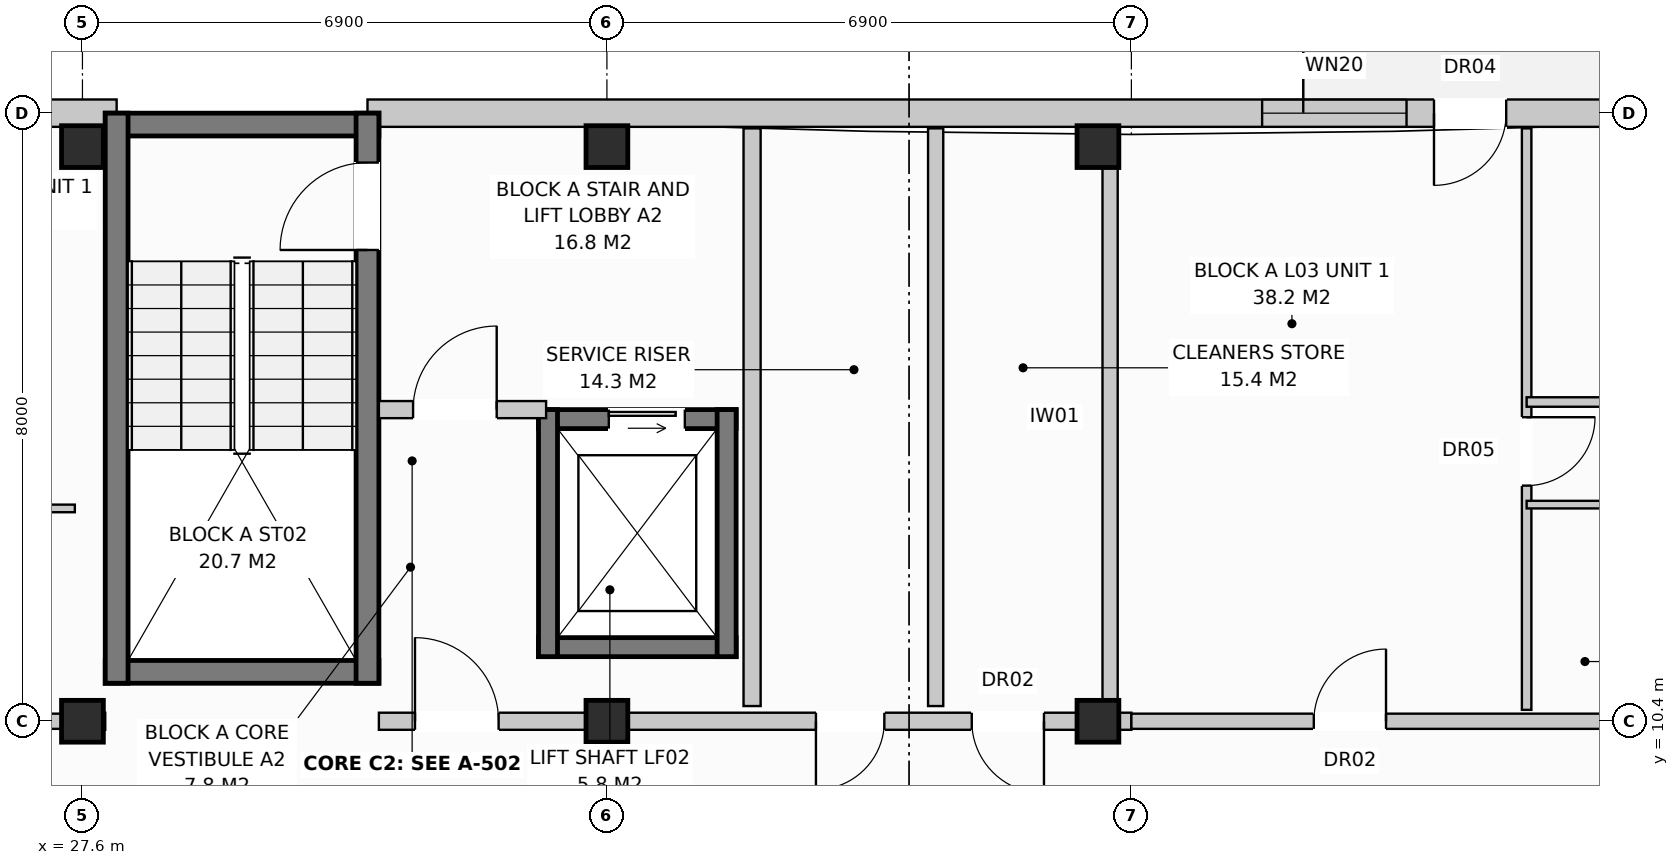
"""IFC4 building model, lengths in metres.
Left out: names, types, materials, properties, quantities, classifications, styles, units other than length and angle.
Written with IfcOpenShell. Run it as: python <this file> out.ifc"""

import sys

from ifc_helpers import new_model, si_unit, direction, frame, frame_2d, origin, origin_with_axes, origin_2d, place, context, subcontext, project, spatial, rectangle, extrude, element, fill, save


model = new_model("IFC4")
c1 = context("Model", 3, precision=1e-05, world=origin(), true_north=direction((0.0, 1.0)))
c2 = subcontext(c1, "Body", "Model", "MODEL_VIEW")
j1 = project(units=[si_unit("LENGTHUNIT", "METRE"), si_unit("PLANEANGLEUNIT", "RADIAN")], contexts=[c1])
p1 = place(None, origin())
s1 = spatial("IfcSite", under=j1, at=p1, CompositionType="ELEMENT")
p2 = place(p1, origin())
s2 = spatial("IfcBuilding", under=s1, at=p2, CompositionType="ELEMENT")
p3 = place(p2, frame((0.0, 0.0, 11.2)))
s3 = spatial("IfcBuildingStorey", under=s2, at=p3, CompositionType="ELEMENT", Elevation=11.2)
for number, where, z_axis, x_axis in (
    (1, (27.6, 10.4, 0.0), (0.0, 0.0, 1.0), (1.0, 0.0, 0.0)),
    (2, (27.6, 17.96, 0.0), (0.0, 0.0, 1.0), (1.0, 0.0, 0.0)),
    (3, (34.5, 10.4, 0.0), (0.0, 0.0, 1.0), (1.0, 0.0, 0.0)),
    (4, (34.5, 17.96, 0.0), (0.0, 0.0, 1.0), (1.0, 0.0, 0.0)),
    (5, (40.96, 10.4, 0.0), (0.0, 0.0, 1.0), (1.0, 0.0, 0.0)),
    (6, (40.96, 17.96, 0.0), (0.0, 0.0, 1.0), (1.0, 0.0, 0.0)),
):
    element("IfcColumn", number, at=place(p3, frame(where, z_axis=z_axis, x_axis=x_axis)), inside=s3, PredefinedType="COLUMN", context=c2, shape_type="SweptSolid", body=[
        extrude(rectangle(XDim=0.55, YDim=0.55, at=origin_2d()), origin(), (0.0, 0.0, 1.0), 3.2),
    ])
p4 = place(p3, frame((10.65, 18.4, 0.0), z_axis=(0.0, 0.0, 1.0), x_axis=(1.0, 0.0, 0.0)))
e7 = element("IfcWall", 7, at=p4, inside=s3, PredefinedType="STANDARD", context=c2, shape_type="SweptSolid", body=[
    extrude(rectangle(XDim=17.4, YDim=0.36, at=frame_2d((8.7, 0.0))), origin(), (0.0, 0.0, 1.0), 2.94),
])
p5 = place(p4, frame((11.87, 0.0, 0.0)))
e8 = element("IfcOpeningElement", 8, at=p5, cuts=e7, PredefinedType="OPENING", context=c2, shape_type="SweptSolid", body=[
    extrude(rectangle(XDim=0.95, YDim=2.1, at=frame_2d((0.475, 1.05))), frame((0.0, 0.192, 0.0), z_axis=(0.0, -1.0, 0.0), x_axis=(1.0, 0.0, 0.0)), (0.0, 0.0, 1.0), 0.384),
])
p6 = place(p4, frame((14.97, 0.0, 0.72)))
e9 = element("IfcOpeningElement", 9, at=p6, cuts=e7, PredefinedType="OPENING", context=c2, shape_type="SweptSolid", body=[
    extrude(rectangle(XDim=1.1, YDim=1.5, at=frame_2d((0.55, 0.75))), frame((0.0, 0.192, 0.0), z_axis=(0.0, -1.0, 0.0), x_axis=(1.0, 0.0, 0.0)), (0.0, 0.0, 1.0), 0.384),
])
p7 = place(p3, frame((31.35, 18.4, 0.0), z_axis=(0.0, 0.0, 1.0), x_axis=(1.0, 0.0, 0.0)))
e10 = element("IfcWall", 10, at=p7, inside=s3, PredefinedType="STANDARD", context=c2, shape_type="SweptSolid", body=[
    extrude(rectangle(XDim=23.68, YDim=0.36, at=frame_2d((11.84, 0.0))), origin(), (0.0, 0.0, 1.0), 2.94),
])
p8 = place(p7, frame((14.031, 0.0, 0.0)))
e11 = element("IfcOpeningElement", 11, at=p8, cuts=e10, PredefinedType="OPENING", context=c2, shape_type="SweptSolid", body=[
    extrude(rectangle(XDim=0.95, YDim=2.1, at=frame_2d((0.475, 1.05))), frame((0.0, 0.192, 0.0), z_axis=(0.0, -1.0, 0.0), x_axis=(1.0, 0.0, 0.0)), (0.0, 0.0, 1.0), 0.384),
])
p9 = place(p7, frame((11.77, 0.0, 0.8)))
e12 = element("IfcOpeningElement", 12, at=p9, cuts=e10, PredefinedType="OPENING", context=c2, shape_type="SweptSolid", body=[
    extrude(rectangle(XDim=1.9, YDim=1.85, at=frame_2d((0.95, 0.925))), frame((0.0, 0.192, 0.0), z_axis=(0.0, -1.0, 0.0), x_axis=(1.0, 0.0, 0.0)), (0.0, 0.0, 1.0), 0.384),
])
p10 = place(p7, frame((17.403, 0.0, 0.8)))
e13 = element("IfcOpeningElement", 13, at=p10, cuts=e10, PredefinedType="OPENING", context=c2, shape_type="SweptSolid", body=[
    extrude(rectangle(XDim=1.95, YDim=1.65, at=frame_2d((0.975, 0.825))), frame((0.0, 0.192, 0.0), z_axis=(0.0, -1.0, 0.0), x_axis=(1.0, 0.0, 0.0)), (0.0, 0.0, 1.0), 0.384),
])
p11 = place(p7, frame((21.07, 0.0, 0.72)))
e14 = element("IfcOpeningElement", 14, at=p11, cuts=e10, PredefinedType="OPENING", context=c2, shape_type="SweptSolid", body=[
    extrude(rectangle(XDim=1.1, YDim=1.5, at=frame_2d((0.55, 0.75))), frame((0.0, 0.192, 0.0), z_axis=(0.0, -1.0, 0.0), x_axis=(1.0, 0.0, 0.0)), (0.0, 0.0, 1.0), 0.384),
])
for number, where, z_axis, x_axis in (
    (15, (27.9, 18.25, 0.0), (0.0, 0.0, 1.0), (1.0, 0.0, 0.0)),
    (16, (27.9, 11.05, 0.0), (0.0, 0.0, 1.0), (1.0, 0.0, 0.0)),
):
    element("IfcWall", number, at=place(p3, frame(where, z_axis=z_axis, x_axis=x_axis)), inside=s3, PredefinedType="SHEAR", context=c2, shape_type="SweptSolid", body=[
        extrude(rectangle(XDim=3.6, YDim=0.3, at=frame_2d((1.8, 0.0))), origin(), (0.0, 0.0, 1.0), 2.94),
    ])
p12 = place(p3, frame((28.05, 10.9, 0.0), z_axis=(0.0, 0.0, 1.0), x_axis=(0.0, 1.0, 0.0)))
e17 = element("IfcWall", 17, at=p12, inside=s3, PredefinedType="SHEAR", context=c2, shape_type="SweptSolid", body=[
    extrude(rectangle(XDim=7.5, YDim=0.3, at=frame_2d((3.75, 0.0))), origin(), (0.0, 0.0, 1.0), 2.94),
])
p13 = place(p3, frame((31.35, 10.9, 0.0), z_axis=(0.0, 0.0, 1.0), x_axis=(0.0, 1.0, 0.0)))
e18 = element("IfcWall", 18, at=p13, inside=s3, PredefinedType="SHEAR", context=c2, shape_type="SweptSolid", body=[
    extrude(rectangle(XDim=7.5, YDim=0.3, at=frame_2d((3.75, 0.0))), origin(), (0.0, 0.0, 1.0), 2.94),
])
p14 = place(p13, frame((5.7, 0.0, 0.0)))
e19 = element("IfcOpeningElement", 19, at=p14, cuts=e18, PredefinedType="OPENING", context=c2, shape_type="SweptSolid", body=[
    extrude(rectangle(XDim=1.15, YDim=2.15, at=frame_2d((0.575, 1.075))), frame((0.0, 0.162, 0.0), z_axis=(0.0, -1.0, 0.0), x_axis=(1.0, 0.0, 0.0)), (0.0, 0.0, 1.0), 0.324),
])
p15 = place(p3, frame((33.6, 14.375, 0.0), z_axis=(0.0, 0.0, 1.0), x_axis=(1.0, 0.0, 0.0)))
e20 = element("IfcWall", 20, at=p15, inside=s3, PredefinedType="SHEAR", context=c2, shape_type="SweptSolid", body=[
    extrude(rectangle(XDim=2.6, YDim=0.25, at=frame_2d((1.3, 0.0))), origin(), (0.0, 0.0, 1.0), 2.94),
])
p16 = place(p15, frame((0.925, 0.0, 0.0)))
e21 = element("IfcOpeningElement", 21, at=p16, cuts=e20, PredefinedType="OPENING", context=c2, shape_type="SweptSolid", body=[
    extrude(rectangle(XDim=1.0, YDim=2.1, at=frame_2d((0.5, 1.05))), frame((0.0, 0.137, 0.0), z_axis=(0.0, -1.0, 0.0), x_axis=(1.0, 0.0, 0.0)), (0.0, 0.0, 1.0), 0.274),
])
p17 = place(p3, frame((33.6, 11.375, 0.0), z_axis=(0.0, 0.0, 1.0), x_axis=(1.0, 0.0, 0.0)))
e22 = element("IfcWall", 22, at=p17, inside=s3, PredefinedType="SHEAR", context=c2, shape_type="SweptSolid", body=[
    extrude(rectangle(XDim=2.6, YDim=0.25, at=frame_2d((1.3, 0.0))), origin(), (0.0, 0.0, 1.0), 2.94),
])
for number, where, z_axis, x_axis in (
    (23, (33.725, 11.25, 0.0), (0.0, 0.0, 1.0), (0.0, 1.0, 0.0)),
    (24, (36.075, 11.25, 0.0), (0.0, 0.0, 1.0), (0.0, 1.0, 0.0)),
):
    element("IfcWall", number, at=place(p3, frame(where, z_axis=z_axis, x_axis=x_axis)), inside=s3, PredefinedType="SHEAR", context=c2, shape_type="SweptSolid", body=[
        extrude(rectangle(XDim=3.25, YDim=0.25, at=frame_2d((1.625, 0.0))), origin(), (0.0, 0.0, 1.0), 2.94),
    ])
p18 = place(p3, frame((36.41, 10.6, 0.0), z_axis=(0.0, 0.0, 1.0), x_axis=(0.0, 1.0, 0.0)))
e25 = element("IfcWall", 25, at=p18, inside=s3, PredefinedType="PARTITIONING", context=c2, shape_type="SweptSolid", body=[
    extrude(rectangle(XDim=7.6, YDim=0.225, at=frame_2d((3.8, 0.0))), origin(), (0.0, 0.0, 1.0), 2.59),
])
p19 = place(p3, frame((31.5, 14.5, 0.0), z_axis=(0.0, 0.0, 1.0), x_axis=(1.0, 0.0, 0.0)))
e26 = element("IfcWall", 26, at=p19, inside=s3, PredefinedType="PARTITIONING", context=c2, shape_type="SweptSolid", body=[
    extrude(rectangle(XDim=2.2, YDim=0.225, at=frame_2d((1.1, 0.0))), origin(), (0.0, 0.0, 1.0), 2.94),
])
p20 = place(p19, frame((0.45, 0.0, 0.0)))
e27 = element("IfcOpeningElement", 27, at=p20, cuts=e26, PredefinedType="OPENING", context=c2, shape_type="SweptSolid", body=[
    extrude(rectangle(XDim=1.1, YDim=2.15, at=frame_2d((0.55, 1.075))), frame((0.0, 0.125, 0.0), z_axis=(0.0, -1.0, 0.0), x_axis=(1.0, 0.0, 0.0)), (0.0, 0.0, 1.0), 0.249),
])
p21 = place(p3, frame((27.6, 10.4, 0.0), z_axis=(0.0, 0.0, 1.0), x_axis=(1.0, 0.0, 0.0)))
e28 = element("IfcWall", 28, at=p21, inside=s3, PredefinedType="PARTITIONING", context=c2, shape_type="SweptSolid", body=[
    extrude(rectangle(XDim=0.3, YDim=0.225, at=frame_2d((0.15, 0.0))), origin(), (0.0, 0.0, 1.0), 2.94),
])
for number, where, z_axis, x_axis in (
    (29, (38.825, 10.6, 0.0), (0.0, 0.0, 1.0), (0.0, 1.0, 0.0)),
    (30, (41.12, 10.6, 0.0), (0.0, 0.0, 1.0), (0.0, 1.0, 0.0)),
):
    element("IfcWall", number, at=place(p3, frame(where, z_axis=z_axis, x_axis=x_axis)), inside=s3, PredefinedType="PARTITIONING", context=c2, shape_type="SweptSolid", body=[
        extrude(rectangle(XDim=7.6, YDim=0.2, at=frame_2d((3.8, 0.0))), origin(), (0.0, 0.0, 1.0), 2.94),
    ])
p22 = place(p3, frame((31.5, 10.4, 0.0), z_axis=(0.0, 0.0, 1.0), x_axis=(1.0, 0.0, 0.0)))
e31 = element("IfcWall", 31, at=p22, inside=s3, PredefinedType="PARTITIONING", context=c2, shape_type="SweptSolid", body=[
    extrude(rectangle(XDim=9.9, YDim=0.225, at=frame_2d((4.95, 0.0))), origin(), (0.0, 0.0, 1.0), 2.38),
])
p23 = place(p22, frame((0.475, 0.0, 0.0)))
e32 = element("IfcOpeningElement", 32, at=p23, cuts=e31, PredefinedType="OPENING", context=c2, shape_type="SweptSolid", body=[
    extrude(rectangle(XDim=1.1, YDim=2.15, at=frame_2d((0.55, 1.075))), frame((0.0, 0.125, 0.0), z_axis=(0.0, -1.0, 0.0), x_axis=(1.0, 0.0, 0.0)), (0.0, 0.0, 1.0), 0.249),
])
p24 = place(p22, frame((5.75, 0.0, 0.0)))
e33 = element("IfcOpeningElement", 33, at=p24, cuts=e31, PredefinedType="OPENING", context=c2, shape_type="SweptSolid", body=[
    extrude(rectangle(XDim=0.9, YDim=2.1, at=frame_2d((0.45, 1.05))), frame((0.0, 0.125, 0.0), z_axis=(0.0, -1.0, 0.0), x_axis=(1.0, 0.0, 0.0)), (0.0, 0.0, 1.0), 0.249),
])
p25 = place(p22, frame((7.8, 0.0, 0.0)))
e34 = element("IfcOpeningElement", 34, at=p25, cuts=e31, PredefinedType="OPENING", context=c2, shape_type="SweptSolid", body=[
    extrude(rectangle(XDim=0.95, YDim=2.15, at=frame_2d((0.475, 1.075))), frame((0.0, 0.125, 0.0), z_axis=(0.0, -1.0, 0.0), x_axis=(1.0, 0.0, 0.0)), (0.0, 0.0, 1.0), 0.249),
])
p26 = place(p3, frame((20.7, 10.4, 0.0), z_axis=(0.0, 0.0, 1.0), x_axis=(1.0, 0.0, 0.0)))
e35 = element("IfcWall", 35, at=p26, inside=s3, PredefinedType="PARTITIONING", context=c2, shape_type="SweptSolid", body=[
    extrude(rectangle(XDim=6.9, YDim=0.2, at=frame_2d((3.45, 0.0))), origin(), (0.0, 0.0, 1.0), 2.38),
])
p27 = place(p26, frame((2.0, 0.0, 0.0)))
e36 = element("IfcOpeningElement", 36, at=p27, cuts=e35, PredefinedType="OPENING", context=c2, shape_type="SweptSolid", body=[
    extrude(rectangle(XDim=0.95, YDim=2.15, at=frame_2d((0.475, 1.075))), frame((0.0, 0.112, 0.0), z_axis=(0.0, -1.0, 0.0), x_axis=(1.0, 0.0, 0.0)), (0.0, 0.0, 1.0), 0.224),
])
p28 = place(p3, frame((25.0, 13.2, 0.0), z_axis=(0.0, 0.0, 1.0), x_axis=(1.0, 0.0, 0.0)))
e37 = element("IfcWall", 37, at=p28, inside=s3, PredefinedType="PARTITIONING", context=c2, shape_type="SweptSolid", body=[
    extrude(rectangle(XDim=2.5, YDim=0.1, at=frame_2d((1.25, 0.0))), origin(), (0.0, 0.0, 1.0), 2.94),
])
p29 = place(p3, frame((41.4, 10.4, 0.0), z_axis=(0.0, 0.0, 1.0), x_axis=(1.0, 0.0, 0.0)))
e38 = element("IfcWall", 38, at=p29, inside=s3, PredefinedType="PARTITIONING", context=c2, shape_type="SweptSolid", body=[
    extrude(rectangle(XDim=13.8, YDim=0.2, at=frame_2d((6.9, 0.0))), origin(), (0.0, 0.0, 1.0), 2.38),
])
p30 = place(p29, frame((2.4, 0.0, 0.0)))
e39 = element("IfcOpeningElement", 39, at=p30, cuts=e38, PredefinedType="OPENING", context=c2, shape_type="SweptSolid", body=[
    extrude(rectangle(XDim=0.95, YDim=2.15, at=frame_2d((0.475, 1.075))), frame((0.0, 0.112, 0.0), z_axis=(0.0, -1.0, 0.0), x_axis=(1.0, 0.0, 0.0)), (0.0, 0.0, 1.0), 0.224),
])
p31 = place(p3, frame((46.6, 10.55, 0.0), z_axis=(0.0, 0.0, 1.0), x_axis=(0.0, 1.0, 0.0)))
e40 = element("IfcWall", 40, at=p31, inside=s3, PredefinedType="PARTITIONING", context=c2, shape_type="SweptSolid", body=[
    extrude(rectangle(XDim=7.65, YDim=0.125, at=frame_2d((3.825, 0.0))), origin(), (0.0, 0.0, 1.0), 2.94),
])
p32 = place(p31, frame((2.95, 0.0, 0.0)))
e41 = element("IfcOpeningElement", 41, at=p32, cuts=e40, PredefinedType="OPENING", context=c2, shape_type="SweptSolid", body=[
    extrude(rectangle(XDim=0.9, YDim=2.1, at=frame_2d((0.45, 1.05))), frame((0.0, 0.074, 0.0), z_axis=(0.0, -1.0, 0.0), x_axis=(1.0, 0.0, 0.0)), (0.0, 0.0, 1.0), 0.149),
])
p33 = place(p3, frame((46.6, 13.25, 0.0), z_axis=(0.0, 0.0, 1.0), x_axis=(1.0, 0.0, 0.0)))
e42 = element("IfcWall", 42, at=p33, inside=s3, PredefinedType="PARTITIONING", context=c2, shape_type="SweptSolid", body=[
    extrude(rectangle(XDim=8.5, YDim=0.1, at=frame_2d((4.25, 0.0))), origin(), (0.0, 0.0, 1.0), 2.94),
])
p34 = place(p33, frame((1.0, 0.0, 0.0)))
e43 = element("IfcOpeningElement", 43, at=p34, cuts=e42, PredefinedType="OPENING", context=c2, shape_type="SweptSolid", body=[
    extrude(rectangle(XDim=0.85, YDim=2.1, at=frame_2d((0.425, 1.05))), frame((0.0, 0.062, 0.0), z_axis=(0.0, -1.0, 0.0), x_axis=(1.0, 0.0, 0.0)), (0.0, 0.0, 1.0), 0.124),
])
p35 = place(p33, frame((3.4, 0.0, 0.0)))
e44 = element("IfcOpeningElement", 44, at=p35, cuts=e42, PredefinedType="OPENING", context=c2, shape_type="SweptSolid", body=[
    extrude(rectangle(XDim=0.85, YDim=2.05, at=frame_2d((0.425, 1.025))), frame((0.0, 0.062, 0.0), z_axis=(0.0, -1.0, 0.0), x_axis=(1.0, 0.0, 0.0)), (0.0, 0.0, 1.0), 0.124),
])
p36 = place(p33, frame((6.2, 0.0, 0.0)))
e45 = element("IfcOpeningElement", 45, at=p36, cuts=e42, PredefinedType="OPENING", context=c2, shape_type="SweptSolid", body=[
    extrude(rectangle(XDim=0.85, YDim=2.05, at=frame_2d((0.425, 1.025))), frame((0.0, 0.062, 0.0), z_axis=(0.0, -1.0, 0.0), x_axis=(1.0, 0.0, 0.0)), (0.0, 0.0, 1.0), 0.124),
])
p37 = place(p3, frame((46.6, 14.6, 0.0), z_axis=(0.0, 0.0, 1.0), x_axis=(1.0, 0.0, 0.0)))
e46 = element("IfcWall", 46, at=p37, inside=s3, PredefinedType="PARTITIONING", context=c2, shape_type="SweptSolid", body=[
    extrude(rectangle(XDim=8.5, YDim=0.125, at=frame_2d((4.25, 0.0))), origin(), (0.0, 0.0, 1.0), 2.94),
])
p38 = place(p37, frame((1.5, 0.0, 0.0)))
e47 = element("IfcOpeningElement", 47, at=p38, cuts=e46, PredefinedType="OPENING", context=c2, shape_type="SweptSolid", body=[
    extrude(rectangle(XDim=0.9, YDim=2.1, at=frame_2d((0.45, 1.05))), frame((0.0, 0.074, 0.0), z_axis=(0.0, -1.0, 0.0), x_axis=(1.0, 0.0, 0.0)), (0.0, 0.0, 1.0), 0.149),
])
p39 = place(p37, frame((5.6, 0.0, 0.0)))
e48 = element("IfcOpeningElement", 48, at=p39, cuts=e46, PredefinedType="OPENING", context=c2, shape_type="SweptSolid", body=[
    extrude(rectangle(XDim=0.9, YDim=2.1, at=frame_2d((0.45, 1.05))), frame((0.0, 0.074, 0.0), z_axis=(0.0, -1.0, 0.0), x_axis=(1.0, 0.0, 0.0)), (0.0, 0.0, 1.0), 0.149),
])
p40 = place(p8, frame((0.95, 0.0, 0.0), z_axis=(0.0, 0.0, 1.0), x_axis=(-1.0, 0.0, 0.0)))
e49 = element("IfcDoor", 49, at=p40, inside=s3, OperationType="SINGLE_SWING_LEFT", PredefinedType="DOOR", context=c2, shape_type="SweptSolid", body=[
    extrude(rectangle(XDim=0.95, YDim=2.1, at=frame_2d((0.475, 1.05))), frame((0.0, 0.025, 0.0), z_axis=(0.0, -1.0, 0.0), x_axis=(1.0, 0.0, 0.0)), (0.0, 0.0, 1.0), 0.05),
])
fill(e11, e49)
p41 = place(p9, origin_with_axes())
e50 = element("IfcWindow", 50, at=p41, inside=s3, PartitioningType="SINGLE_PANEL", PredefinedType="WINDOW", context=c2, shape_type="SweptSolid", body=[
    extrude(rectangle(XDim=1.9, YDim=1.85, at=frame_2d((0.95, 0.925))), frame((0.0, 0.03, 0.0), z_axis=(0.0, -1.0, 0.0), x_axis=(1.0, 0.0, 0.0)), (0.0, 0.0, 1.0), 0.06),
])
fill(e12, e50)
p42 = place(p14, origin_with_axes())
e51 = element("IfcDoor", 51, at=p42, inside=s3, OperationType="SINGLE_SWING_LEFT", PredefinedType="DOOR", context=c2, shape_type="SweptSolid", body=[
    extrude(rectangle(XDim=1.15, YDim=2.15, at=frame_2d((0.575, 1.075))), frame((0.0, 0.025, 0.0), z_axis=(0.0, -1.0, 0.0), x_axis=(1.0, 0.0, 0.0)), (0.0, 0.0, 1.0), 0.05),
])
fill(e19, e51)
p43 = place(p16, origin_with_axes())
e52 = element("IfcDoor", 52, at=p43, inside=s3, OperationType="SLIDING_TO_LEFT", PredefinedType="DOOR", context=c2, shape_type="SweptSolid", body=[
    extrude(rectangle(XDim=1.0, YDim=2.1, at=frame_2d((0.5, 1.05))), frame((0.0, 0.025, 0.0), z_axis=(0.0, -1.0, 0.0), x_axis=(1.0, 0.0, 0.0)), (0.0, 0.0, 1.0), 0.05),
])
fill(e21, e52)
p44 = place(p20, origin_with_axes())
e53 = element("IfcDoor", 53, at=p44, inside=s3, OperationType="SINGLE_SWING_RIGHT", PredefinedType="DOOR", context=c2, shape_type="SweptSolid", body=[
    extrude(rectangle(XDim=1.1, YDim=2.15, at=frame_2d((0.55, 1.075))), frame((0.0, 0.025, 0.0), z_axis=(0.0, -1.0, 0.0), x_axis=(1.0, 0.0, 0.0)), (0.0, 0.0, 1.0), 0.05),
])
fill(e27, e53)
p45 = place(p23, origin_with_axes())
e54 = element("IfcDoor", 54, at=p45, inside=s3, OperationType="SINGLE_SWING_LEFT", PredefinedType="DOOR", context=c2, shape_type="SweptSolid", body=[
    extrude(rectangle(XDim=1.1, YDim=2.15, at=frame_2d((0.55, 1.075))), frame((0.0, 0.025, 0.0), z_axis=(0.0, -1.0, 0.0), x_axis=(1.0, 0.0, 0.0)), (0.0, 0.0, 1.0), 0.05),
])
fill(e32, e54)
p46 = place(p24, frame((0.9, 0.0, 0.0), z_axis=(0.0, 0.0, 1.0), x_axis=(-1.0, 0.0, 0.0)))
e55 = element("IfcDoor", 55, at=p46, inside=s3, OperationType="SINGLE_SWING_LEFT", PredefinedType="DOOR", context=c2, shape_type="SweptSolid", body=[
    extrude(rectangle(XDim=0.9, YDim=2.1, at=frame_2d((0.45, 1.05))), frame((0.0, 0.025, 0.0), z_axis=(0.0, -1.0, 0.0), x_axis=(1.0, 0.0, 0.0)), (0.0, 0.0, 1.0), 0.05),
])
fill(e33, e55)
p47 = place(p25, frame((0.95, 0.0, 0.0), z_axis=(0.0, 0.0, 1.0), x_axis=(-1.0, 0.0, 0.0)))
e56 = element("IfcDoor", 56, at=p47, inside=s3, OperationType="SINGLE_SWING_RIGHT", PredefinedType="DOOR", context=c2, shape_type="SweptSolid", body=[
    extrude(rectangle(XDim=0.95, YDim=2.15, at=frame_2d((0.475, 1.075))), frame((0.0, 0.025, 0.0), z_axis=(0.0, -1.0, 0.0), x_axis=(1.0, 0.0, 0.0)), (0.0, 0.0, 1.0), 0.05),
])
fill(e34, e56)
p48 = place(p30, origin_with_axes())
e57 = element("IfcDoor", 57, at=p48, inside=s3, OperationType="SINGLE_SWING_RIGHT", PredefinedType="DOOR", context=c2, shape_type="SweptSolid", body=[
    extrude(rectangle(XDim=0.95, YDim=2.15, at=frame_2d((0.475, 1.075))), frame((0.0, 0.025, 0.0), z_axis=(0.0, -1.0, 0.0), x_axis=(1.0, 0.0, 0.0)), (0.0, 0.0, 1.0), 0.05),
])
fill(e39, e57)
p49 = place(p32, frame((0.9, 0.0, 0.0), z_axis=(0.0, 0.0, 1.0), x_axis=(-1.0, 0.0, 0.0)))
e58 = element("IfcDoor", 58, at=p49, inside=s3, OperationType="SINGLE_SWING_RIGHT", PredefinedType="DOOR", context=c2, shape_type="SweptSolid", body=[
    extrude(rectangle(XDim=0.9, YDim=2.1, at=frame_2d((0.45, 1.05))), frame((0.0, 0.025, 0.0), z_axis=(0.0, -1.0, 0.0), x_axis=(1.0, 0.0, 0.0)), (0.0, 0.0, 1.0), 0.05),
])
fill(e41, e58)
save(model, sys.argv[1])
